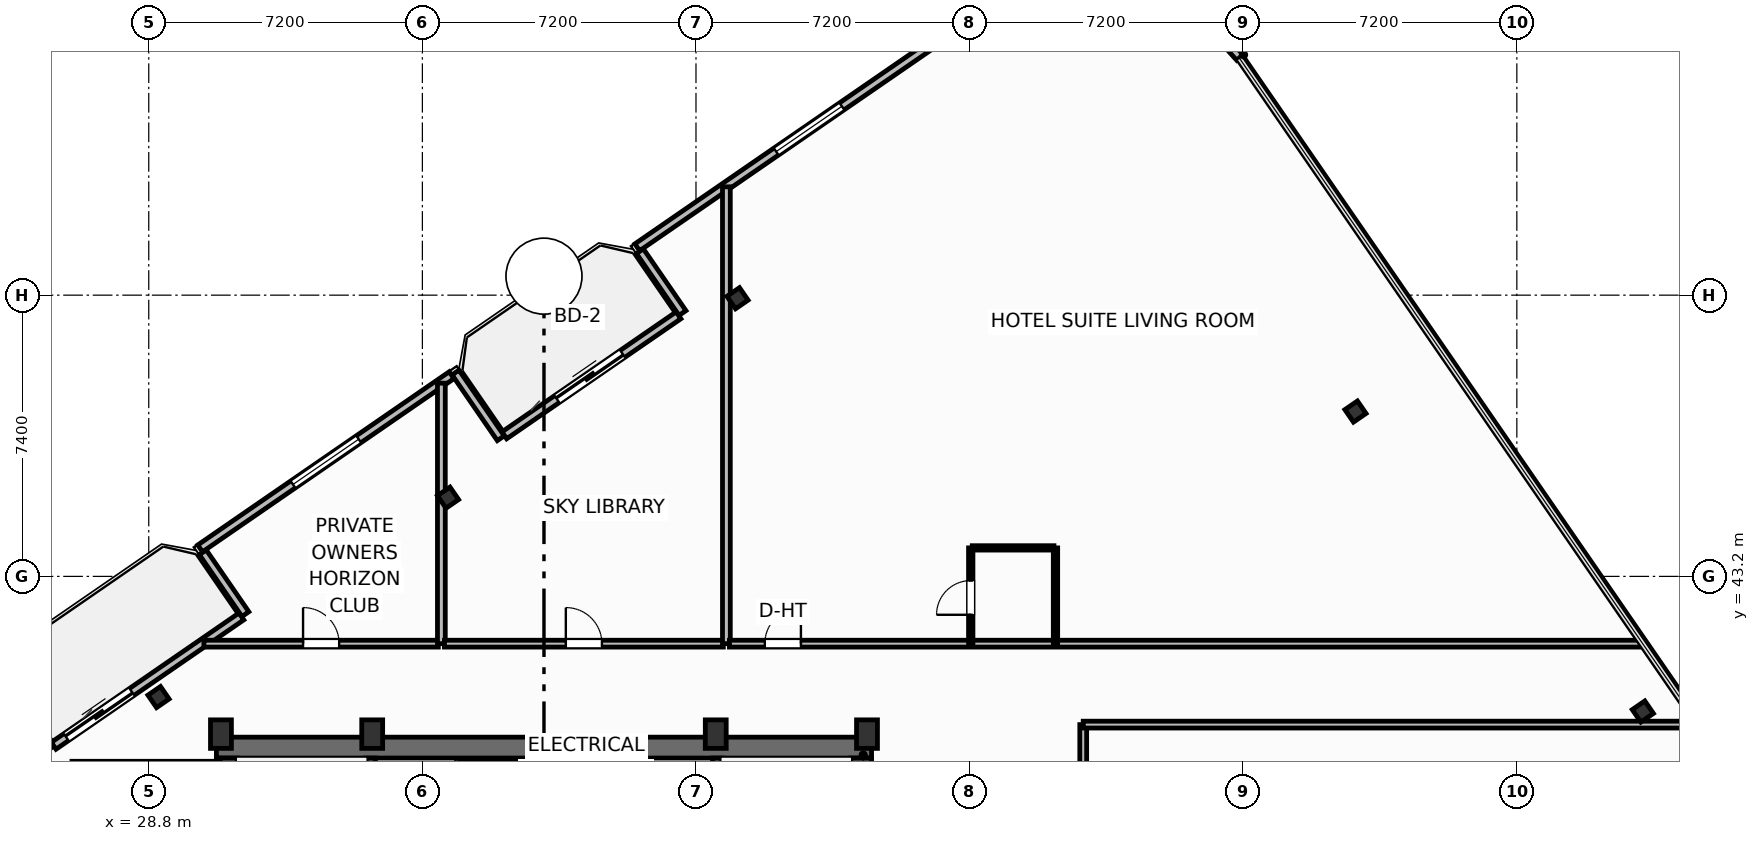
"""IFC4 building model, lengths in metres.
Left out: names, types, materials, properties, quantities, classifications, styles, units other than length and angle.
Written with IfcOpenShell. Run it as: python <this file> out.ifc"""

import sys

from ifc_helpers import new_model, si_unit, direction, frame, frame_2d, origin, origin_2d, place, context, subcontext, project, spatial, rectangle, i_section, extrude, element, fill, save


model = new_model("IFC4")
c1 = context("Model", 3, precision=1e-05, world=origin(), true_north=direction((0.0, 1.0)))
c2 = subcontext(c1, "Body", "Model", "MODEL_VIEW")
j1 = project(units=[si_unit("LENGTHUNIT", "METRE"), si_unit("PLANEANGLEUNIT", "RADIAN")], contexts=[c1])
p1 = place(None, origin())
s1 = spatial("IfcSite", under=j1, at=p1, CompositionType="ELEMENT")
p2 = place(p1, origin())
s2 = spatial("IfcBuilding", under=s1, at=p2, CompositionType="ELEMENT")
p3 = place(p2, frame((0.0, 0.0, 261.9)))
s3 = spatial("IfcBuildingStorey", under=s2, at=p3, CompositionType="ELEMENT", Elevation=261.9)
for number, where, z_axis, x_axis in (
    (1, (30.7, 39.05, 0.0), (0.0, 0.0, 1.0), (1.0, 0.0, 0.0)),
    (2, (34.68, 39.05, 0.0), (0.0, 0.0, 1.0), (1.0, 0.0, 0.0)),
    (3, (43.72, 39.05, 0.0), (0.0, 0.0, 1.0), (1.0, 0.0, 0.0)),
    (4, (47.7, 39.05, 0.0), (0.0, 0.0, 1.0), (1.0, 0.0, 0.0)),
):
    element("IfcColumn", number, at=place(p3, frame(where, z_axis=z_axis, x_axis=x_axis)), inside=s3, PredefinedType="COLUMN", context=c2, shape_type="SweptSolid", body=[
        extrude(rectangle(XDim=0.55, YDim=0.75, at=origin_2d()), origin(), (0.0, 0.0, 1.0), 3.7),
    ])
p4 = place(p3, frame((30.58, 38.695, 0.0), z_axis=(0.0, 0.0, 1.0), x_axis=(1.0, 0.0, 0.0)))
e5 = element("IfcWall", 5, at=p4, inside=s3, PredefinedType="SHEAR", context=c2, shape_type="SweptSolid", body=[
    extrude(rectangle(XDim=17.24, YDim=0.55, at=frame_2d((8.62, 0.0))), origin(), (0.0, 0.0, 1.0), 3.45),
])
for number, where, z_axis, x_axis in (
    (6, (30.855, 29.2, 0.0), (0.0, 0.0, 1.0), (0.0, 1.0, 0.0)),
    (7, (47.545, 29.2, 0.0), (0.0, 0.0, 1.0), (0.0, 1.0, 0.0)),
):
    element("IfcWall", number, at=place(p3, frame(where, z_axis=z_axis, x_axis=x_axis)), inside=s3, PredefinedType="SHEAR", context=c2, shape_type="SweptSolid", body=[
        extrude(rectangle(XDim=9.22, YDim=0.55, at=frame_2d((4.61, 0.0))), origin(), (0.0, 0.0, 1.0), 3.45),
    ])
p5 = place(p3, frame((34.64, 29.2, 0.0), z_axis=(0.0, 0.0, 1.0), x_axis=(0.0, 1.0, 0.0)))
e8 = element("IfcWall", 8, at=p5, inside=s3, PredefinedType="SHEAR", context=c2, shape_type="SweptSolid", body=[
    extrude(rectangle(XDim=9.22, YDim=0.25, at=frame_2d((4.61, 0.0))), origin(), (0.0, 0.0, 1.0), 3.45),
])
p6 = place(p5, frame((0.65, 0.0, 0.0)))
e9 = element("IfcOpeningElement", 9, at=p6, cuts=e8, PredefinedType="OPENING", context=c2, shape_type="SweptSolid", body=[
    extrude(rectangle(XDim=1.05, YDim=2.15, at=frame_2d((0.525, 1.075))), frame((0.0, 0.135, 0.0), z_axis=(0.0, -1.0, 0.0), x_axis=(1.0, 0.0, 0.0)), (0.0, 0.0, 1.0), 0.27),
])
p7 = place(p3, frame((43.76, 29.2, 0.0), z_axis=(0.0, 0.0, 1.0), x_axis=(0.0, 1.0, 0.0)))
e10 = element("IfcWall", 10, at=p7, inside=s3, PredefinedType="SHEAR", context=c2, shape_type="SweptSolid", body=[
    extrude(rectangle(XDim=9.22, YDim=0.25, at=frame_2d((4.61, 0.0))), origin(), (0.0, 0.0, 1.0), 3.45),
])
p8 = place(p7, frame((0.65, 0.0, 0.0)))
e11 = element("IfcOpeningElement", 11, at=p8, cuts=e10, PredefinedType="OPENING", context=c2, shape_type="SweptSolid", body=[
    extrude(rectangle(XDim=1.05, YDim=2.15, at=frame_2d((0.525, 1.075))), frame((0.0, 0.135, 0.0), z_axis=(0.0, -1.0, 0.0), x_axis=(1.0, 0.0, 0.0)), (0.0, 0.0, 1.0), 0.27),
])
for number, where, z_axis, x_axis in (
    (12, (68.115, 39.644, 0.0), (0.0, 0.0, 1.0), (0.824, 0.567, 0.0)),
    (13, (60.554, 47.537, 0.0), (0.0, 0.0, 1.0), (0.824, 0.567, 0.0)),
    (14, (44.292, 50.519, 0.0), (0.0, 0.0, 1.0), (0.824, 0.567, 0.0)),
    (15, (36.675, 45.272, 0.0), (0.0, 0.0, 1.0), (0.824, 0.567, 0.0)),
    (16, (29.057, 40.025, 0.0), (0.0, 0.0, 1.0), (0.824, 0.567, 0.0)),
):
    element("IfcColumn", number, at=place(p3, frame(where, z_axis=z_axis, x_axis=x_axis)), inside=s3, PredefinedType="COLUMN", context=c2, shape_type="SweptSolid", body=[
        extrude(i_section(OverallWidth=0.401, OverallDepth=0.399, WebThickness=0.025, FlangeThickness=0.04, FilletRadius=0.022, at=origin_2d()), origin(), (0.0, 0.0, 1.0), 3.7),
    ])
p9 = place(p3, frame((26.297, 38.743, 0.0), z_axis=(0.0, 0.0, 1.0), x_axis=(0.823534636215, 0.567265989598, 0.0)))
e17 = element("IfcWall", 17, at=p9, inside=s3, PredefinedType="SOLIDWALL", context=c2, shape_type="SweptSolid", body=[
    extrude(rectangle(XDim=6.0, YDim=0.22, at=frame_2d((3.0, 0.0))), origin(), (0.0, 0.0, 1.0), 2.73),
])
p10 = place(p9, frame((0.4, 0.0, 0.0)))
e18 = element("IfcOpeningElement", 18, at=p10, cuts=e17, PredefinedType="OPENING", context=c2, shape_type="SweptSolid", body=[
    extrude(rectangle(XDim=2.1, YDim=2.3, at=frame_2d((1.05, 1.15))), frame((0.0, 0.12, 0.0), z_axis=(0.0, -1.0, 0.0), x_axis=(1.0, 0.0, 0.0)), (0.0, 0.0, 1.0), 0.24),
])
p11 = place(p3, frame((38.156, 46.912, 0.0), z_axis=(0.0, 0.0, 1.0), x_axis=(0.823527178548, 0.567276816195, 0.0)))
e19 = element("IfcWall", 19, at=p11, inside=s3, PredefinedType="SOLIDWALL", context=c2, shape_type="SweptSolid", body=[
    extrude(rectangle(XDim=5.567, YDim=0.22, at=frame_2d((2.783, 0.0))), origin(), (0.0, 0.0, 1.0), 2.73),
])
p12 = place(p11, frame((1.68, 0.0, 0.0)))
e20 = element("IfcOpeningElement", 20, at=p12, cuts=e19, PredefinedType="OPENING", context=c2, shape_type="SweptSolid", body=[
    extrude(rectangle(XDim=2.1, YDim=2.3, at=frame_2d((1.05, 1.15))), frame((0.0, 0.12, 0.0), z_axis=(0.0, -1.0, 0.0), x_axis=(1.0, 0.0, 0.0)), (0.0, 0.0, 1.0), 0.24),
])
p13 = place(p3, frame((57.51, 56.855, 0.0), z_axis=(0.0, 0.0, 1.0), x_axis=(-0.669853727156, 0.742493086982, 0.0)))
e21 = element("IfcWall", 21, at=p13, inside=s3, PredefinedType="SOLIDWALL", context=c2, shape_type="SweptSolid", body=[
    extrude(rectangle(XDim=1.274, YDim=0.22, at=frame_2d((0.637, 0.0))), origin(), (0.0, 0.0, 1.0), 2.73),
])
p14 = place(p3, frame((50.697, 58.087, 0.0), z_axis=(0.0, 0.0, 1.0), x_axis=(-0.823539455464, -0.567258993137, 0.0)))
e22 = element("IfcWall", 22, at=p14, inside=s3, PredefinedType="SOLIDWALL", context=c2, shape_type="SweptSolid", body=[
    extrude(rectangle(XDim=10.98, YDim=0.22, at=frame_2d((5.49, 0.0))), origin(), (0.0, 0.0, 1.0), 2.73),
])
p15 = place(p14, frame((4.44, 0.0, 0.8)))
e23 = element("IfcOpeningElement", 23, at=p15, cuts=e22, PredefinedType="OPENING", context=c2, shape_type="SweptSolid", body=[
    extrude(rectangle(XDim=2.1, YDim=1.75, at=frame_2d((1.05, 0.875))), frame((0.0, 0.12, 0.0), z_axis=(0.0, -1.0, 0.0), x_axis=(1.0, 0.0, 0.0)), (0.0, 0.0, 1.0), 0.24),
])
p16 = place(p3, frame((41.725, 51.756, 0.0), z_axis=(0.0, 0.0, 1.0), x_axis=(0.567273565974, -0.823529417415, 0.0)))
e24 = element("IfcWall", 24, at=p16, inside=s3, PredefinedType="SOLIDWALL", context=c2, shape_type="SweptSolid", body=[
    extrude(rectangle(XDim=1.975, YDim=0.22, at=frame_2d((0.988, 0.0))), origin(), (0.0, 0.0, 1.0), 2.73),
])
p17 = place(p3, frame((38.063, 46.835, 0.0), z_axis=(0.0, 0.0, 1.0), x_axis=(-0.567219383419, 0.823566737474, 0.0)))
e25 = element("IfcWall", 25, at=p17, inside=s3, PredefinedType="SOLIDWALL", context=c2, shape_type="SweptSolid", body=[
    extrude(rectangle(XDim=2.1, YDim=0.22, at=frame_2d((1.05, 0.0))), origin(), (0.0, 0.0, 1.0), 2.73),
])
p18 = place(p3, frame((36.769, 48.494, 0.0), z_axis=(0.0, 0.0, 1.0), x_axis=(-0.823521165086, -0.56728554596, 0.0)))
e26 = element("IfcWall", 26, at=p18, inside=s3, PredefinedType="SOLIDWALL", context=c2, shape_type="SweptSolid", body=[
    extrude(rectangle(XDim=8.035, YDim=0.22, at=frame_2d((4.018, 0.0))), origin(), (0.0, 0.0, 1.0), 2.73),
])
p19 = place(p18, frame((2.968, 0.0, 0.8)))
e27 = element("IfcOpeningElement", 27, at=p19, cuts=e26, PredefinedType="OPENING", context=c2, shape_type="SweptSolid", body=[
    extrude(rectangle(XDim=2.1, YDim=1.75, at=frame_2d((1.05, 0.875))), frame((0.0, 0.12, 0.0), z_axis=(0.0, -1.0, 0.0), x_axis=(1.0, 0.0, 0.0)), (0.0, 0.0, 1.0), 0.24),
])
p20 = place(p3, frame((30.223, 43.833, 0.0), z_axis=(0.0, 0.0, 1.0), x_axis=(0.567215821234, -0.823569190865, 0.0)))
e28 = element("IfcWall", 28, at=p20, inside=s3, PredefinedType="SOLIDWALL", context=c2, shape_type="SweptSolid", body=[
    extrude(rectangle(XDim=1.975, YDim=0.22, at=frame_2d((0.988, 0.0))), origin(), (0.0, 0.0, 1.0), 2.73),
])
p21 = place(p3, frame((26.204, 38.667, 0.0), z_axis=(0.0, 0.0, 1.0), x_axis=(-0.567219383419, 0.823566737474, 0.0)))
e29 = element("IfcWall", 29, at=p21, inside=s3, PredefinedType="SOLIDWALL", context=c2, shape_type="SweptSolid", body=[
    extrude(rectangle(XDim=2.1, YDim=0.22, at=frame_2d((1.05, 0.0))), origin(), (0.0, 0.0, 1.0), 2.73),
])
p22 = place(p3, frame((30.251, 41.43, 0.0), z_axis=(0.0, 0.0, 1.0), x_axis=(1.0, 0.0, 0.0)))
e30 = element("IfcWall", 30, at=p22, inside=s3, PredefinedType="PARTITIONING", context=c2, shape_type="SweptSolid", body=[
    extrude(rectangle(XDim=6.169, YDim=0.18, at=frame_2d((3.084, 0.0))), origin(), (0.0, 0.0, 1.0), 3.45),
])
p23 = place(p22, frame((2.609, 0.0, 0.0)))
e31 = element("IfcOpeningElement", 31, at=p23, cuts=e30, PredefinedType="OPENING", context=c2, shape_type="SweptSolid", body=[
    extrude(rectangle(XDim=0.95, YDim=2.05, at=frame_2d((0.475, 1.025))), frame((0.0, 0.1, 0.0), z_axis=(0.0, -1.0, 0.0), x_axis=(1.0, 0.0, 0.0)), (0.0, 0.0, 1.0), 0.2),
])
p24 = place(p3, frame((36.5, 41.43, 0.0), z_axis=(0.0, 0.0, 1.0), x_axis=(0.0, 1.0, 0.0)))
e32 = element("IfcWall", 32, at=p24, inside=s3, PredefinedType="PARTITIONING", context=c2, shape_type="SweptSolid", body=[
    extrude(rectangle(XDim=6.854, YDim=0.205, at=frame_2d((3.427, 0.0))), origin(), (0.0, 0.0, 1.0), 2.739),
])
p25 = place(p3, frame((36.58, 41.43, 0.0), z_axis=(0.0, 0.0, 1.0), x_axis=(1.0, 0.0, 0.0)))
e33 = element("IfcWall", 33, at=p25, inside=s3, PredefinedType="PARTITIONING", context=c2, shape_type="SweptSolid", body=[
    extrude(rectangle(XDim=7.34, YDim=0.18, at=frame_2d((3.67, 0.0))), origin(), (0.0, 0.0, 1.0), 3.45),
])
p26 = place(p25, frame((3.195, 0.0, 0.0)))
e34 = element("IfcOpeningElement", 34, at=p26, cuts=e33, PredefinedType="OPENING", context=c2, shape_type="SweptSolid", body=[
    extrude(rectangle(XDim=0.95, YDim=2.05, at=frame_2d((0.475, 1.025))), frame((0.0, 0.1, 0.0), z_axis=(0.0, -1.0, 0.0), x_axis=(1.0, 0.0, 0.0)), (0.0, 0.0, 1.0), 0.2),
])
p27 = place(p3, frame((44.0, 41.43, 0.0), z_axis=(0.0, 0.0, 1.0), x_axis=(0.0, 1.0, 0.0)))
e35 = element("IfcWall", 35, at=p27, inside=s3, PredefinedType="PARTITIONING", context=c2, shape_type="SweptSolid", body=[
    extrude(rectangle(XDim=12.021, YDim=0.205, at=frame_2d((6.01, 0.0))), origin(), (0.0, 0.0, 1.0), 2.739),
])
p28 = place(p3, frame((44.08, 41.43, 0.0), z_axis=(0.0, 0.0, 1.0), x_axis=(1.0, 0.0, 0.0)))
e36 = element("IfcWall", 36, at=p28, inside=s3, PredefinedType="PARTITIONING", context=c2, shape_type="SweptSolid", body=[
    extrude(rectangle(XDim=23.992, YDim=0.18, at=frame_2d((11.996, 0.0))), origin(), (0.0, 0.0, 1.0), 3.45),
])
p29 = place(p28, frame((0.931, 0.0, 0.0)))
e37 = element("IfcOpeningElement", 37, at=p29, cuts=e36, PredefinedType="OPENING", context=c2, shape_type="SweptSolid", body=[
    extrude(rectangle(XDim=0.95, YDim=2.15, at=frame_2d((0.475, 1.075))), frame((0.0, 0.1, 0.0), z_axis=(0.0, -1.0, 0.0), x_axis=(1.0, 0.0, 0.0)), (0.0, 0.0, 1.0), 0.2),
])
p30 = place(p3, frame((50.47, 43.95, 0.0), z_axis=(0.0, 0.0, 1.0), x_axis=(1.0, 0.0, 0.0)))
e38 = element("IfcWall", 38, at=p30, inside=s3, PredefinedType="PARTITIONING", context=c2, shape_type="SweptSolid", body=[
    extrude(rectangle(XDim=2.15, YDim=0.115, at=frame_2d((1.075, 0.0))), origin(), (0.0, 0.0, 1.0), 3.45),
])
p31 = place(p3, frame((50.43, 41.43, 0.0), z_axis=(0.0, 0.0, 1.0), x_axis=(0.0, 1.0, 0.0)))
e39 = element("IfcWall", 39, at=p31, inside=s3, PredefinedType="PARTITIONING", context=c2, shape_type="SweptSolid", body=[
    extrude(rectangle(XDim=2.52, YDim=0.115, at=frame_2d((1.26, 0.0))), origin(), (0.0, 0.0, 1.0), 3.45),
])
p32 = place(p31, frame((0.76, 0.0, 0.0)))
e40 = element("IfcOpeningElement", 40, at=p32, cuts=e39, PredefinedType="OPENING", context=c2, shape_type="SweptSolid", body=[
    extrude(rectangle(XDim=0.9, YDim=2.05, at=frame_2d((0.45, 1.025))), frame((0.0, 0.067, 0.0), z_axis=(0.0, -1.0, 0.0), x_axis=(1.0, 0.0, 0.0)), (0.0, 0.0, 1.0), 0.135),
])
p33 = place(p3, frame((52.66, 41.43, 0.0), z_axis=(0.0, 0.0, 1.0), x_axis=(0.0, 1.0, 0.0)))
e41 = element("IfcWall", 41, at=p33, inside=s3, PredefinedType="PARTITIONING", context=c2, shape_type="SweptSolid", body=[
    extrude(rectangle(XDim=2.52, YDim=0.115, at=frame_2d((1.26, 0.0))), origin(), (0.0, 0.0, 1.0), 3.45),
])
p34 = place(p3, frame((53.39, 19.24, 0.0), z_axis=(0.0, 0.0, 1.0), x_axis=(0.0, 1.0, 0.0)))
e42 = element("IfcWall", 42, at=p34, inside=s3, PredefinedType="PARTITIONING", context=c2, shape_type="SweptSolid", body=[
    extrude(rectangle(XDim=20.06, YDim=0.18, at=frame_2d((10.03, 0.0))), origin(), (0.0, 0.0, 1.0), 3.45),
])
p35 = place(p34, frame((7.7, 0.0, 0.0)))
e43 = element("IfcOpeningElement", 43, at=p35, cuts=e42, PredefinedType="OPENING", context=c2, shape_type="SweptSolid", body=[
    extrude(rectangle(XDim=0.95, YDim=2.05, at=frame_2d((0.475, 1.025))), frame((0.0, 0.1, 0.0), z_axis=(0.0, -1.0, 0.0), x_axis=(1.0, 0.0, 0.0)), (0.0, 0.0, 1.0), 0.2),
])
p36 = place(p3, frame((53.39, 39.3, 0.0), z_axis=(0.0, 0.0, 1.0), x_axis=(1.0, 0.0, 0.0)))
e44 = element("IfcWall", 44, at=p36, inside=s3, PredefinedType="PARTITIONING", context=c2, shape_type="SweptSolid", body=[
    extrude(rectangle(XDim=16.149, YDim=0.18, at=frame_2d((8.075, 0.0))), origin(), (0.0, 0.0, 1.0), 2.739),
])
p37 = place(p10, origin())
e45 = element("IfcDoor", 45, at=p37, inside=s3, OperationType="SLIDING_TO_LEFT", PredefinedType="DOOR", context=c2, shape_type="SweptSolid", body=[
    extrude(rectangle(XDim=2.1, YDim=2.3, at=frame_2d((1.05, 1.15))), frame((0.0, 0.025, 0.0), z_axis=(0.0, -1.0, 0.0), x_axis=(1.0, 0.0, 0.0)), (0.0, 0.0, 1.0), 0.05),
])
fill(e18, e45)
p38 = place(p12, origin())
e46 = element("IfcDoor", 46, at=p38, inside=s3, OperationType="SLIDING_TO_LEFT", PredefinedType="DOOR", context=c2, shape_type="SweptSolid", body=[
    extrude(rectangle(XDim=2.1, YDim=2.3, at=frame_2d((1.05, 1.15))), frame((0.0, 0.025, 0.0), z_axis=(0.0, -1.0, 0.0), x_axis=(1.0, 0.0, 0.0)), (0.0, 0.0, 1.0), 0.05),
])
fill(e20, e46)
p39 = place(p15, origin())
e47 = element("IfcWindow", 47, at=p39, inside=s3, PartitioningType="SINGLE_PANEL", PredefinedType="WINDOW", context=c2, shape_type="SweptSolid", body=[
    extrude(rectangle(XDim=2.1, YDim=1.75, at=frame_2d((1.05, 0.875))), frame((0.0, 0.03, 0.0), z_axis=(0.0, -1.0, 0.0), x_axis=(1.0, 0.0, 0.0)), (0.0, 0.0, 1.0), 0.06),
])
fill(e23, e47)
p40 = place(p19, origin())
e48 = element("IfcWindow", 48, at=p40, inside=s3, PartitioningType="SINGLE_PANEL", PredefinedType="WINDOW", context=c2, shape_type="SweptSolid", body=[
    extrude(rectangle(XDim=2.1, YDim=1.75, at=frame_2d((1.05, 0.875))), frame((0.0, 0.03, 0.0), z_axis=(0.0, -1.0, 0.0), x_axis=(1.0, 0.0, 0.0)), (0.0, 0.0, 1.0), 0.06),
])
fill(e27, e48)
p41 = place(p23, origin())
e49 = element("IfcDoor", 49, at=p41, inside=s3, OperationType="SINGLE_SWING_LEFT", PredefinedType="DOOR", context=c2, shape_type="SweptSolid", body=[
    extrude(rectangle(XDim=0.95, YDim=2.05, at=frame_2d((0.475, 1.025))), frame((0.0, 0.025, 0.0), z_axis=(0.0, -1.0, 0.0), x_axis=(1.0, 0.0, 0.0)), (0.0, 0.0, 1.0), 0.05),
])
fill(e31, e49)
p42 = place(p26, origin())
e50 = element("IfcDoor", 50, at=p42, inside=s3, OperationType="SINGLE_SWING_LEFT", PredefinedType="DOOR", context=c2, shape_type="SweptSolid", body=[
    extrude(rectangle(XDim=0.95, YDim=2.05, at=frame_2d((0.475, 1.025))), frame((0.0, 0.025, 0.0), z_axis=(0.0, -1.0, 0.0), x_axis=(1.0, 0.0, 0.0)), (0.0, 0.0, 1.0), 0.05),
])
fill(e34, e50)
p43 = place(p29, origin())
e51 = element("IfcDoor", 51, at=p43, inside=s3, OperationType="SINGLE_SWING_RIGHT", PredefinedType="DOOR", context=c2, shape_type="SweptSolid", body=[
    extrude(rectangle(XDim=0.95, YDim=2.15, at=frame_2d((0.475, 1.075))), frame((0.0, 0.025, 0.0), z_axis=(0.0, -1.0, 0.0), x_axis=(1.0, 0.0, 0.0)), (0.0, 0.0, 1.0), 0.05),
])
fill(e37, e51)
p44 = place(p32, origin())
e52 = element("IfcDoor", 52, at=p44, inside=s3, OperationType="SINGLE_SWING_LEFT", PredefinedType="DOOR", context=c2, shape_type="SweptSolid", body=[
    extrude(rectangle(XDim=0.9, YDim=2.05, at=frame_2d((0.45, 1.025))), frame((0.0, 0.025, 0.0), z_axis=(0.0, -1.0, 0.0), x_axis=(1.0, 0.0, 0.0)), (0.0, 0.0, 1.0), 0.05),
])
fill(e40, e52)
save(model, sys.argv[1])
